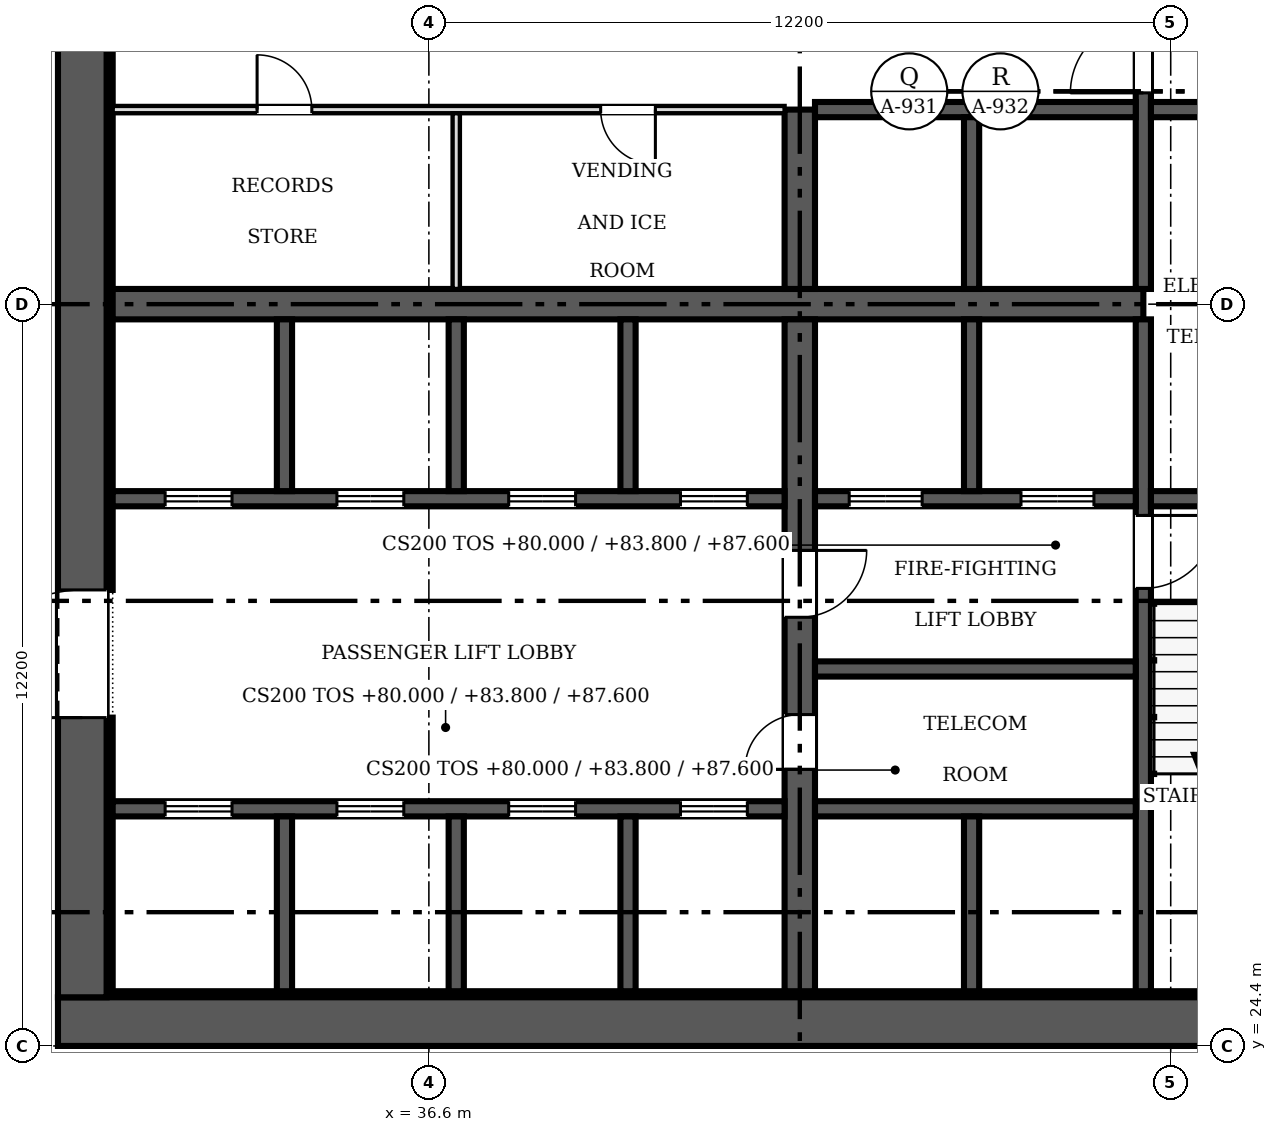
"""IFC4 building model, lengths in metres.
Left out: names, types, materials, properties, quantities, classifications, styles, units other than length and angle.
Written with IfcOpenShell. Run it as: python <this file> out.ifc"""

import sys

from ifc_helpers import new_model, si_unit, direction, frame, frame_2d, origin, place, context, subcontext, project, spatial, rectangle, extrude, source, transform, mapped, element, fill, save


model = new_model("IFC4")
c1 = context("Model", 3, precision=1e-05, world=origin(), true_north=direction((0.0, 1.0)))
c2 = subcontext(c1, "Body", "Model", "MODEL_VIEW")
j1 = project(units=[si_unit("LENGTHUNIT", "METRE"), si_unit("PLANEANGLEUNIT", "RADIAN")], contexts=[c1])
p1 = place(None, origin())
s1 = spatial("IfcSite", under=j1, at=p1, CompositionType="ELEMENT")
p2 = place(p1, origin())
s2 = spatial("IfcBuilding", under=s1, at=p2, CompositionType="ELEMENT")
p3 = place(p2, frame((0.0, 0.0, 80.0)))
s3 = spatial("IfcBuildingStorey", under=s2, at=p3, CompositionType="ELEMENT", Elevation=80.0)
p4 = place(p3, frame((54.9, 24.8, 0.0), z_axis=(0.0, 0.0, 1.0), x_axis=(-1.0, 0.0, 0.0)))
e1 = element("IfcWall", 1, at=p4, inside=s3, PredefinedType="SHEAR", context=c2, shape_type="SweptSolid", body=[
    extrude(rectangle(XDim=24.4, YDim=0.8, at=frame_2d((12.2, 0.0))), origin(), (0.0, 0.0, 1.0), 3.8),
])
m1 = source(origin(), c2, "Body", "SweptSolid", [
    extrude(rectangle(XDim=1.2, YDim=2.1, at=frame_2d((0.6, 1.05))), frame((0.0, 0.41, 0.0), z_axis=(0.0, -1.0, 0.0), x_axis=(1.0, 0.0, 0.0)), (0.0, 0.0, 1.0), 0.82),
])
p5 = place(p4, frame((1.5, 0.0, 0.0)))
e2 = element("IfcOpeningElement", 2, at=p5, cuts=e1, PredefinedType="OPENING", context=c2, shape_type="MappedRepresentation", body=[
    mapped(m1, transform((0.0, 0.0, 0.0), scale=1.0)),
])
p6 = place(p3, frame((30.9, 25.2, 0.0), z_axis=(0.0, 0.0, 1.0), x_axis=(0.0, 1.0, 0.0)))
e3 = element("IfcWall", 3, at=p6, inside=s3, PredefinedType="SHEAR", context=c2, shape_type="SweptSolid", body=[
    extrude(rectangle(XDim=22.8, YDim=0.8, at=frame_2d((11.4, 0.0))), origin(), (0.0, 0.0, 1.0), 3.8),
])
m2 = source(origin(), c2, "Body", "SweptSolid", [
    extrude(rectangle(XDim=2.1, YDim=2.4, at=frame_2d((1.05, 1.2))), frame((0.0, 0.41, 0.0), z_axis=(0.0, -1.0, 0.0), x_axis=(1.0, 0.0, 0.0)), (0.0, 0.0, 1.0), 0.82),
])
p7 = place(p6, frame((4.6, 0.0, 0.0)))
e4 = element("IfcOpeningElement", 4, at=p7, cuts=e3, PredefinedType="OPENING", context=c2, shape_type="MappedRepresentation", body=[
    mapped(m2, transform((0.0, 0.0, 0.0), scale=1.0)),
])
p8 = place(p6, frame((16.1, 0.0, 0.0)))
e5 = element("IfcOpeningElement", 5, at=p8, cuts=e3, PredefinedType="OPENING", context=c2, shape_type="MappedRepresentation", body=[
    mapped(m2, transform((0.0, 0.0, 0.0), scale=1.0)),
])
p9 = place(p3, frame((31.3, 25.25, 0.0), z_axis=(0.0, 0.0, 1.0), x_axis=(1.0, 0.0, 0.0)))
e6 = element("IfcWall", 6, at=p9, inside=s3, PredefinedType="SOLIDWALL", context=c2, shape_type="SweptSolid", body=[
    extrude(rectangle(XDim=20.9, YDim=0.1, at=frame_2d((10.45, 0.0))), origin(), (0.0, 0.0, 1.0), 3.8),
])
p10 = place(p3, frame((31.35, 25.3, 0.0), z_axis=(0.0, 0.0, 1.0), x_axis=(0.0, 1.0, 0.0)))
e7 = element("IfcWall", 7, at=p10, inside=s3, PredefinedType="SOLIDWALL", context=c2, shape_type="SweptSolid", body=[
    extrude(rectangle(XDim=4.5, YDim=0.1, at=frame_2d((2.25, 0.0))), origin(), (0.0, 0.0, 1.0), 3.8),
])
p11 = place(p3, frame((31.35, 31.9, 0.0), z_axis=(0.0, 0.0, 1.0), x_axis=(0.0, 1.0, 0.0)))
e8 = element("IfcWall", 8, at=p11, inside=s3, PredefinedType="SOLIDWALL", context=c2, shape_type="SweptSolid", body=[
    extrude(rectangle(XDim=9.4, YDim=0.1, at=frame_2d((4.7, 0.0))), origin(), (0.0, 0.0, 1.0), 3.8),
])
p12 = place(p3, frame((31.4, 36.6, 0.0), z_axis=(0.0, 0.0, 1.0), x_axis=(1.0, 0.0, 0.0)))
e9 = element("IfcWall", 9, at=p12, inside=s3, PredefinedType="SHEAR", context=c2, shape_type="SweptSolid", body=[
    extrude(rectangle(XDim=16.95, YDim=0.5, at=frame_2d((8.475, 0.0))), origin(), (0.0, 0.0, 1.0), 3.8),
])
p13 = place(p3, frame((42.7, 36.35, 0.0), z_axis=(0.0, 0.0, 1.0), x_axis=(0.0, -1.0, 0.0)))
e10 = element("IfcWall", 10, at=p13, inside=s3, PredefinedType="SHEAR", context=c2, shape_type="SweptSolid", body=[
    extrude(rectangle(XDim=11.05, YDim=0.5, at=frame_2d((5.525, 0.0))), origin(), (0.0, 0.0, 1.0), 3.8),
])
m3 = source(origin(), c2, "Body", "SweptSolid", [
    extrude(rectangle(XDim=0.9, YDim=2.1, at=frame_2d((0.45, 1.05))), frame((0.0, 0.26, 0.0), z_axis=(0.0, -1.0, 0.0), x_axis=(1.0, 0.0, 0.0)), (0.0, 0.0, 1.0), 0.52),
])
p14 = place(p13, frame((6.5, 0.0, 0.0)))
e11 = element("IfcOpeningElement", 11, at=p14, cuts=e10, PredefinedType="OPENING", context=c2, shape_type="MappedRepresentation", body=[
    mapped(m3, transform((0.0, 0.0, 0.0), scale=1.0)),
])
m4 = source(origin(), c2, "Body", "SweptSolid", [
    extrude(rectangle(XDim=1.1, YDim=2.1, at=frame_2d((0.55, 1.05))), frame((0.0, 0.26, 0.0), z_axis=(0.0, -1.0, 0.0), x_axis=(1.0, 0.0, 0.0)), (0.0, 0.0, 1.0), 0.52),
])
p15 = place(p13, frame((3.8, 0.0, 0.0)))
e12 = element("IfcOpeningElement", 12, at=p15, cuts=e10, PredefinedType="OPENING", context=c2, shape_type="MappedRepresentation", body=[
    mapped(m4, transform((0.0, 0.0, 0.0), scale=1.0)),
])
p16 = place(p3, frame((42.7, 36.85, 0.0), z_axis=(0.0, 0.0, 1.0), x_axis=(0.0, 1.0, 0.0)))
e13 = element("IfcWall", 13, at=p16, inside=s3, PredefinedType="SHEAR", context=c2, shape_type="SweptSolid", body=[
    extrude(rectangle(XDim=2.95, YDim=0.5, at=frame_2d((1.475, 0.0))), origin(), (0.0, 0.0, 1.0), 3.8),
])
p17 = place(p3, frame((48.35, 36.35, 0.0), z_axis=(0.0, 0.0, 1.0), x_axis=(0.0, -1.0, 0.0)))
e14 = element("IfcWall", 14, at=p17, inside=s3, PredefinedType="SOLIDWALL", context=c2, shape_type="SweptSolid", body=[
    extrude(rectangle(XDim=11.05, YDim=0.25, at=frame_2d((5.525, 0.0))), origin(), (0.0, 0.0, 1.0), 3.8),
])
m5 = source(origin(), c2, "Body", "SweptSolid", [
    extrude(rectangle(XDim=1.2, YDim=2.1, at=frame_2d((0.6, 1.05))), frame((0.0, 0.135, 0.0), z_axis=(0.0, -1.0, 0.0), x_axis=(1.0, 0.0, 0.0)), (0.0, 0.0, 1.0), 0.27),
])
p18 = place(p17, frame((3.225, 0.0, 0.0)))
e15 = element("IfcOpeningElement", 15, at=p18, cuts=e14, PredefinedType="OPENING", context=c2, shape_type="MappedRepresentation", body=[
    mapped(m5, transform((0.0, 0.0, 0.0), scale=1.0)),
])
p19 = place(p3, frame((48.35, 47.9, 0.0), z_axis=(0.0, 0.0, 1.0), x_axis=(0.0, -1.0, 0.0)))
e16 = element("IfcWall", 16, at=p19, inside=s3, PredefinedType="SOLIDWALL", context=c2, shape_type="SweptSolid", body=[
    extrude(rectangle(XDim=11.05, YDim=0.25, at=frame_2d((5.525, 0.0))), origin(), (0.0, 0.0, 1.0), 3.8),
])
p20 = place(p19, frame((6.625, 0.0, 0.0)))
e17 = element("IfcOpeningElement", 17, at=p20, cuts=e16, PredefinedType="OPENING", context=c2, shape_type="MappedRepresentation", body=[
    mapped(m5, transform((0.0, 0.0, 0.0), scale=1.0)),
])
p21 = place(p3, frame((42.45, 33.4, 0.0), z_axis=(0.0, 0.0, 1.0), x_axis=(-1.0, 0.0, 0.0)))
e18 = element("IfcWall", 18, at=p21, inside=s3, PredefinedType="SOLIDWALL", context=c2, shape_type="SweptSolid", body=[
    extrude(rectangle(XDim=11.05, YDim=0.25, at=frame_2d((5.525, 0.0))), origin(), (0.0, 0.0, 1.0), 3.8),
])
m6 = source(origin(), c2, "Body", "SweptSolid", [
    extrude(rectangle(XDim=1.1, YDim=2.1, at=frame_2d((0.55, 1.05))), frame((0.0, 0.135, 0.0), z_axis=(0.0, -1.0, 0.0), x_axis=(1.0, 0.0, 0.0)), (0.0, 0.0, 1.0), 0.27),
])
p22 = place(p21, frame((9.087, 0.0, 0.0)))
e19 = element("IfcOpeningElement", 19, at=p22, cuts=e18, PredefinedType="OPENING", context=c2, shape_type="MappedRepresentation", body=[
    mapped(m6, transform((0.0, 0.0, 0.0), scale=1.0)),
])
p23 = place(p21, frame((6.262, 0.0, 0.0)))
e20 = element("IfcOpeningElement", 20, at=p23, cuts=e18, PredefinedType="OPENING", context=c2, shape_type="MappedRepresentation", body=[
    mapped(m6, transform((0.0, 0.0, 0.0), scale=1.0)),
])
p24 = place(p21, frame((3.438, 0.0, 0.0)))
e21 = element("IfcOpeningElement", 21, at=p24, cuts=e18, PredefinedType="OPENING", context=c2, shape_type="MappedRepresentation", body=[
    mapped(m6, transform((0.0, 0.0, 0.0), scale=1.0)),
])
p25 = place(p21, frame((0.613, 0.0, 0.0)))
e22 = element("IfcOpeningElement", 22, at=p25, cuts=e18, PredefinedType="OPENING", context=c2, shape_type="MappedRepresentation", body=[
    mapped(m6, transform((0.0, 0.0, 0.0), scale=1.0)),
])
p26 = place(p3, frame((48.225, 33.4, 0.0), z_axis=(0.0, 0.0, 1.0), x_axis=(-1.0, 0.0, 0.0)))
e23 = element("IfcWall", 23, at=p26, inside=s3, PredefinedType="SOLIDWALL", context=c2, shape_type="SweptSolid", body=[
    extrude(rectangle(XDim=5.275, YDim=0.25, at=frame_2d((2.638, 0.0))), origin(), (0.0, 0.0, 1.0), 3.8),
])
p27 = place(p26, frame((3.512, 0.0, 0.0)))
e24 = element("IfcOpeningElement", 24, at=p27, cuts=e23, PredefinedType="OPENING", context=c2, shape_type="MappedRepresentation", body=[
    mapped(m5, transform((0.0, 0.0, 0.0), scale=1.0)),
])
p28 = place(p26, frame((0.688, 0.0, 0.0)))
e25 = element("IfcOpeningElement", 25, at=p28, cuts=e23, PredefinedType="OPENING", context=c2, shape_type="MappedRepresentation", body=[
    mapped(m5, transform((0.0, 0.0, 0.0), scale=1.0)),
])
p29 = place(p3, frame((48.475, 33.4, 0.0), z_axis=(0.0, 0.0, 1.0), x_axis=(1.0, 0.0, 0.0)))
e26 = element("IfcWall", 26, at=p29, inside=s3, PredefinedType="SOLIDWALL", context=c2, shape_type="SweptSolid", body=[
    extrude(rectangle(XDim=3.525, YDim=0.25, at=frame_2d((1.762, 0.0))), origin(), (0.0, 0.0, 1.0), 3.8),
])
p30 = place(p3, frame((31.4, 28.3, 0.0), z_axis=(0.0, 0.0, 1.0), x_axis=(1.0, 0.0, 0.0)))
e27 = element("IfcWall", 27, at=p30, inside=s3, PredefinedType="SOLIDWALL", context=c2, shape_type="SweptSolid", body=[
    extrude(rectangle(XDim=11.05, YDim=0.25, at=frame_2d((5.525, 0.0))), origin(), (0.0, 0.0, 1.0), 3.8),
])
p31 = place(p30, frame((0.863, 0.0, 0.0)))
e28 = element("IfcOpeningElement", 28, at=p31, cuts=e27, PredefinedType="OPENING", context=c2, shape_type="MappedRepresentation", body=[
    mapped(m6, transform((0.0, 0.0, 0.0), scale=1.0)),
])
p32 = place(p30, frame((3.688, 0.0, 0.0)))
e29 = element("IfcOpeningElement", 29, at=p32, cuts=e27, PredefinedType="OPENING", context=c2, shape_type="MappedRepresentation", body=[
    mapped(m6, transform((0.0, 0.0, 0.0), scale=1.0)),
])
p33 = place(p30, frame((6.512, 0.0, 0.0)))
e30 = element("IfcOpeningElement", 30, at=p33, cuts=e27, PredefinedType="OPENING", context=c2, shape_type="MappedRepresentation", body=[
    mapped(m6, transform((0.0, 0.0, 0.0), scale=1.0)),
])
p34 = place(p30, frame((9.337, 0.0, 0.0)))
e31 = element("IfcOpeningElement", 31, at=p34, cuts=e27, PredefinedType="OPENING", context=c2, shape_type="MappedRepresentation", body=[
    mapped(m6, transform((0.0, 0.0, 0.0), scale=1.0)),
])
for number, where, z_axis, x_axis in (
    (32, (42.95, 28.3, 0.0), (0.0, 0.0, 1.0), (1.0, 0.0, 0.0)),
    (33, (42.95, 39.8, 0.0), (0.0, 0.0, 1.0), (1.0, 0.0, 0.0)),
):
    element("IfcWall", number, at=place(p3, frame(where, z_axis=z_axis, x_axis=x_axis)), inside=s3, PredefinedType="SOLIDWALL", context=c2, shape_type="SweptSolid", body=[
        extrude(rectangle(XDim=5.275, YDim=0.25, at=frame_2d((2.638, 0.0))), origin(), (0.0, 0.0, 1.0), 3.8),
    ])
p35 = place(p3, frame((48.475, 39.8, 0.0), z_axis=(0.0, 0.0, 1.0), x_axis=(1.0, 0.0, 0.0)))
e34 = element("IfcWall", 34, at=p35, inside=s3, PredefinedType="SOLIDWALL", context=c2, shape_type="SweptSolid", body=[
    extrude(rectangle(XDim=3.525, YDim=0.25, at=frame_2d((1.762, 0.0))), origin(), (0.0, 0.0, 1.0), 3.8),
])
p36 = place(p3, frame((45.525, 33.525, 0.0), z_axis=(0.0, 0.0, 1.0), x_axis=(0.0, 1.0, 0.0)))
e35 = element("IfcWall", 35, at=p36, inside=s3, PredefinedType="SOLIDWALL", context=c2, shape_type="SweptSolid", body=[
    extrude(rectangle(XDim=2.825, YDim=0.25, at=frame_2d((1.413, 0.0))), origin(), (0.0, 0.0, 1.0), 3.8),
])
p37 = place(p3, frame((45.525, 36.85, 0.0), z_axis=(0.0, 0.0, 1.0), x_axis=(0.0, 1.0, 0.0)))
e36 = element("IfcWall", 36, at=p37, inside=s3, PredefinedType="SOLIDWALL", context=c2, shape_type="SweptSolid", body=[
    extrude(rectangle(XDim=2.825, YDim=0.25, at=frame_2d((1.413, 0.0))), origin(), (0.0, 0.0, 1.0), 3.8),
])
p38 = place(p3, frame((42.95, 30.6, 0.0), z_axis=(0.0, 0.0, 1.0), x_axis=(1.0, 0.0, 0.0)))
e37 = element("IfcWall", 37, at=p38, inside=s3, PredefinedType="SOLIDWALL", context=c2, shape_type="SweptSolid", body=[
    extrude(rectangle(XDim=5.275, YDim=0.25, at=frame_2d((2.638, 0.0))), origin(), (0.0, 0.0, 1.0), 3.8),
])
for number, where, z_axis, x_axis in (
    (38, (34.225, 33.525, 0.0), (0.0, 0.0, 1.0), (0.0, 1.0, 0.0)),
    (39, (37.05, 33.525, 0.0), (0.0, 0.0, 1.0), (0.0, 1.0, 0.0)),
    (40, (39.875, 33.525, 0.0), (0.0, 0.0, 1.0), (0.0, 1.0, 0.0)),
):
    element("IfcWall", number, at=place(p3, frame(where, z_axis=z_axis, x_axis=x_axis)), inside=s3, PredefinedType="SOLIDWALL", context=c2, shape_type="SweptSolid", body=[
        extrude(rectangle(XDim=2.825, YDim=0.25, at=frame_2d((1.413, 0.0))), origin(), (0.0, 0.0, 1.0), 3.8),
    ])
for number, where, z_axis, x_axis in (
    (41, (34.225, 25.3, 0.0), (0.0, 0.0, 1.0), (0.0, 1.0, 0.0)),
    (42, (37.05, 25.3, 0.0), (0.0, 0.0, 1.0), (0.0, 1.0, 0.0)),
    (43, (39.875, 25.3, 0.0), (0.0, 0.0, 1.0), (0.0, 1.0, 0.0)),
    (44, (45.525, 25.3, 0.0), (0.0, 0.0, 1.0), (0.0, 1.0, 0.0)),
):
    element("IfcWall", number, at=place(p3, frame(where, z_axis=z_axis, x_axis=x_axis)), inside=s3, PredefinedType="SOLIDWALL", context=c2, shape_type="SweptSolid", body=[
        extrude(rectangle(XDim=2.875, YDim=0.25, at=frame_2d((1.438, 0.0))), origin(), (0.0, 0.0, 1.0), 3.8),
    ])
p39 = place(p3, frame((42.45, 39.8, 0.0), z_axis=(0.0, 0.0, 1.0), x_axis=(-1.0, 0.0, 0.0)))
e45 = element("IfcWall", 45, at=p39, inside=s3, PredefinedType="PARTITIONING", context=c2, shape_type="SweptSolid", body=[
    extrude(rectangle(XDim=11.05, YDim=0.12, at=frame_2d((5.525, 0.0))), origin(), (0.0, 0.0, 1.0), 3.6),
])
m7 = source(origin(), c2, "Body", "SweptSolid", [
    extrude(rectangle(XDim=0.9, YDim=2.1, at=frame_2d((0.45, 1.05))), frame((0.0, 0.07, 0.0), z_axis=(0.0, -1.0, 0.0), x_axis=(1.0, 0.0, 0.0)), (0.0, 0.0, 1.0), 0.14),
])
p40 = place(p39, frame((7.775, 0.0, 0.0)))
e46 = element("IfcOpeningElement", 46, at=p40, cuts=e45, PredefinedType="OPENING", context=c2, shape_type="MappedRepresentation", body=[
    mapped(m7, transform((0.0, 0.0, 0.0), scale=1.0)),
])
p41 = place(p39, frame((2.125, 0.0, 0.0)))
e47 = element("IfcOpeningElement", 47, at=p41, cuts=e45, PredefinedType="OPENING", context=c2, shape_type="MappedRepresentation", body=[
    mapped(m7, transform((0.0, 0.0, 0.0), scale=1.0)),
])
p42 = place(p3, frame((37.05, 36.85, 0.0), z_axis=(0.0, 0.0, 1.0), x_axis=(0.0, 1.0, 0.0)))
e48 = element("IfcWall", 48, at=p42, inside=s3, PredefinedType="PARTITIONING", context=c2, shape_type="SweptSolid", body=[
    extrude(rectangle(XDim=2.89, YDim=0.12, at=frame_2d((1.445, 0.0))), origin(), (0.0, 0.0, 1.0), 3.6),
])
m8 = source(origin(), c2, "Body", "SweptSolid", [
    extrude(rectangle(XDim=2.1, YDim=2.4, at=frame_2d((1.05, 1.2))), frame((0.0, 0.025, 0.0), z_axis=(0.0, -1.0, 0.0), x_axis=(1.0, 0.0, 0.0)), (0.0, 0.0, 1.0), 0.05),
])
p43 = place(p7, origin())
e49 = element("IfcDoor", 49, at=p43, inside=s3, OperationType="DOUBLE_DOOR_SINGLE_SWING", PredefinedType="DOOR", context=c2, shape_type="MappedRepresentation", body=[
    mapped(m8, transform((0.0, 0.0, 0.0), scale=1.0)),
])
fill(e4, e49)
m9 = source(origin(), c2, "Body", "SweptSolid", [
    extrude(rectangle(XDim=0.9, YDim=2.1, at=frame_2d((0.45, 1.05))), frame((0.0, 0.025, 0.0), z_axis=(0.0, -1.0, 0.0), x_axis=(1.0, 0.0, 0.0)), (0.0, 0.0, 1.0), 0.05),
])
p44 = place(p14, origin())
e50 = element("IfcDoor", 50, at=p44, inside=s3, OperationType="SINGLE_SWING_RIGHT", PredefinedType="DOOR", context=c2, shape_type="MappedRepresentation", body=[
    mapped(m9, transform((0.0, 0.0, 0.0), scale=1.0)),
])
fill(e11, e50)
m10 = source(origin(), c2, "Body", "SweptSolid", [
    extrude(rectangle(XDim=1.1, YDim=2.1, at=frame_2d((0.55, 1.05))), frame((0.0, 0.025, 0.0), z_axis=(0.0, -1.0, 0.0), x_axis=(1.0, 0.0, 0.0)), (0.0, 0.0, 1.0), 0.05),
])
p45 = place(p15, origin())
e51 = element("IfcDoor", 51, at=p45, inside=s3, OperationType="SINGLE_SWING_LEFT", PredefinedType="DOOR", context=c2, shape_type="MappedRepresentation", body=[
    mapped(m10, transform((0.0, 0.0, 0.0), scale=1.0)),
])
fill(e12, e51)
m11 = source(origin(), c2, "Body", "SweptSolid", [
    extrude(rectangle(XDim=1.2, YDim=2.1, at=frame_2d((0.6, 1.05))), frame((0.0, 0.025, 0.0), z_axis=(0.0, -1.0, 0.0), x_axis=(1.0, 0.0, 0.0)), (0.0, 0.0, 1.0), 0.05),
])
p46 = place(p18, origin())
e52 = element("IfcDoor", 52, at=p46, inside=s3, OperationType="SINGLE_SWING_LEFT", PredefinedType="DOOR", context=c2, shape_type="MappedRepresentation", body=[
    mapped(m11, transform((0.0, 0.0, 0.0), scale=1.0)),
])
fill(e15, e52)
p47 = place(p20, origin())
e53 = element("IfcDoor", 53, at=p47, inside=s3, OperationType="SINGLE_SWING_RIGHT", PredefinedType="DOOR", context=c2, shape_type="MappedRepresentation", body=[
    mapped(m11, transform((0.0, 0.0, 0.0), scale=1.0)),
])
fill(e17, e53)
p48 = place(p22, origin())
e54 = element("IfcDoor", 54, at=p48, inside=s3, OperationType="DOUBLE_DOOR_SLIDING", PredefinedType="DOOR", context=c2, shape_type="MappedRepresentation", body=[
    mapped(m10, transform((0.0, 0.0, 0.0), scale=1.0)),
])
fill(e19, e54)
p49 = place(p23, origin())
e55 = element("IfcDoor", 55, at=p49, inside=s3, OperationType="DOUBLE_DOOR_SLIDING", PredefinedType="DOOR", context=c2, shape_type="MappedRepresentation", body=[
    mapped(m10, transform((0.0, 0.0, 0.0), scale=1.0)),
])
fill(e20, e55)
p50 = place(p24, origin())
e56 = element("IfcDoor", 56, at=p50, inside=s3, OperationType="DOUBLE_DOOR_SLIDING", PredefinedType="DOOR", context=c2, shape_type="MappedRepresentation", body=[
    mapped(m10, transform((0.0, 0.0, 0.0), scale=1.0)),
])
fill(e21, e56)
p51 = place(p25, origin())
e57 = element("IfcDoor", 57, at=p51, inside=s3, OperationType="DOUBLE_DOOR_SLIDING", PredefinedType="DOOR", context=c2, shape_type="MappedRepresentation", body=[
    mapped(m10, transform((0.0, 0.0, 0.0), scale=1.0)),
])
fill(e22, e57)
p52 = place(p27, origin())
e58 = element("IfcDoor", 58, at=p52, inside=s3, OperationType="DOUBLE_DOOR_SLIDING", PredefinedType="DOOR", context=c2, shape_type="MappedRepresentation", body=[
    mapped(m11, transform((0.0, 0.0, 0.0), scale=1.0)),
])
fill(e24, e58)
p53 = place(p28, origin())
e59 = element("IfcDoor", 59, at=p53, inside=s3, OperationType="DOUBLE_DOOR_SLIDING", PredefinedType="DOOR", context=c2, shape_type="MappedRepresentation", body=[
    mapped(m11, transform((0.0, 0.0, 0.0), scale=1.0)),
])
fill(e25, e59)
p54 = place(p31, origin())
e60 = element("IfcDoor", 60, at=p54, inside=s3, OperationType="DOUBLE_DOOR_SLIDING", PredefinedType="DOOR", context=c2, shape_type="MappedRepresentation", body=[
    mapped(m10, transform((0.0, 0.0, 0.0), scale=1.0)),
])
fill(e28, e60)
p55 = place(p32, origin())
e61 = element("IfcDoor", 61, at=p55, inside=s3, OperationType="DOUBLE_DOOR_SLIDING", PredefinedType="DOOR", context=c2, shape_type="MappedRepresentation", body=[
    mapped(m10, transform((0.0, 0.0, 0.0), scale=1.0)),
])
fill(e29, e61)
p56 = place(p33, origin())
e62 = element("IfcDoor", 62, at=p56, inside=s3, OperationType="DOUBLE_DOOR_SLIDING", PredefinedType="DOOR", context=c2, shape_type="MappedRepresentation", body=[
    mapped(m10, transform((0.0, 0.0, 0.0), scale=1.0)),
])
fill(e30, e62)
p57 = place(p34, origin())
e63 = element("IfcDoor", 63, at=p57, inside=s3, OperationType="DOUBLE_DOOR_SLIDING", PredefinedType="DOOR", context=c2, shape_type="MappedRepresentation", body=[
    mapped(m10, transform((0.0, 0.0, 0.0), scale=1.0)),
])
fill(e31, e63)
p58 = place(p40, origin())
e64 = element("IfcDoor", 64, at=p58, inside=s3, OperationType="SINGLE_SWING_RIGHT", PredefinedType="DOOR", context=c2, shape_type="MappedRepresentation", body=[
    mapped(m9, transform((0.0, 0.0, 0.0), scale=1.0)),
])
fill(e46, e64)
p59 = place(p41, origin())
e65 = element("IfcDoor", 65, at=p59, inside=s3, OperationType="SINGLE_SWING_LEFT", PredefinedType="DOOR", context=c2, shape_type="MappedRepresentation", body=[
    mapped(m9, transform((0.0, 0.0, 0.0), scale=1.0)),
])
fill(e47, e65)
save(model, sys.argv[1])
